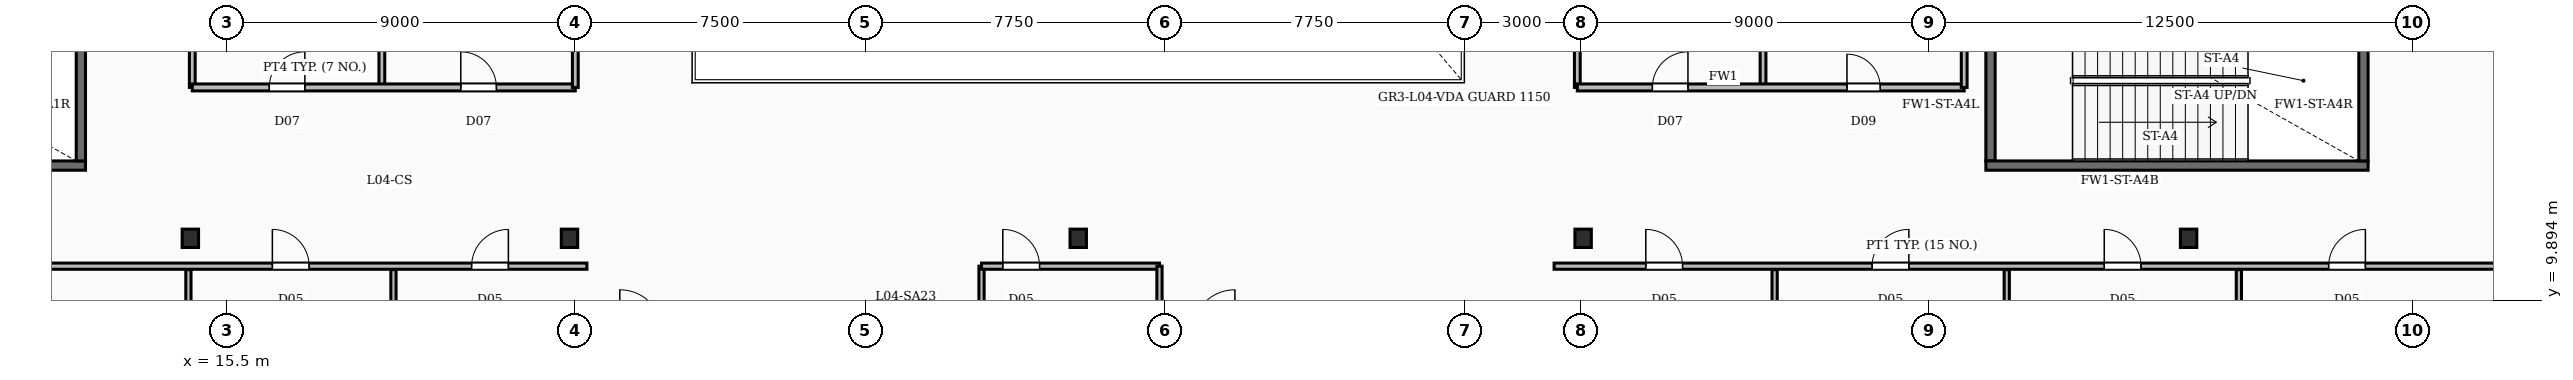
"""IFC4 building model, lengths in metres.
Left out: names, types, materials, properties, quantities, classifications, styles, units other than length and angle.
Written with IfcOpenShell. Run it as: python <this file> out.ifc"""

import sys

from ifc_helpers import new_model, si_unit, direction, frame, frame_2d, origin, origin_2d, place, context, subcontext, project, spatial, rectangle, i_section, extrude, element, fill, save


model = new_model("IFC4")
c1 = context("Model", 3, precision=1e-05, world=origin(), true_north=direction((0.0, 1.0)))
c2 = subcontext(c1, "Body", "Model", "MODEL_VIEW")
j1 = project(units=[si_unit("LENGTHUNIT", "METRE"), si_unit("PLANEANGLEUNIT", "RADIAN")], contexts=[c1])
p1 = place(None, origin())
s1 = spatial("IfcSite", under=j1, at=p1, CompositionType="ELEMENT")
p2 = place(p1, origin())
s2 = spatial("IfcBuilding", under=s1, at=p2, CompositionType="ELEMENT")
p3 = place(p2, frame((0.0, 0.0, 23.0)))
s3 = spatial("IfcBuildingStorey", under=s2, at=p3, CompositionType="ELEMENT", Elevation=23.0)
for number, where, z_axis, x_axis in (
    (1, (14.55, 11.5, -0.35), (0.0, 0.0, 1.0), (1.0, 0.0, 0.0)),
    (2, (24.35, 11.5, -0.35), (0.0, 0.0, 1.0), (1.0, 0.0, 0.0)),
    (3, (37.5, 11.5, -0.35), (0.0, 0.0, 1.0), (1.0, 0.0, 0.0)),
    (4, (50.55, 11.5, -0.35), (0.0, 0.0, 1.0), (1.0, 0.0, 0.0)),
    (5, (66.2, 11.5, -0.35), (0.0, 0.0, 1.0), (1.0, 0.0, 0.0)),
):
    element("IfcColumn", number, at=place(p3, frame(where, z_axis=z_axis, x_axis=x_axis)), inside=s3, PredefinedType="COLUMN", context=c2, shape_type="SweptSolid", body=[
        extrude(i_section(OverallWidth=0.424, OverallDepth=0.474, WebThickness=0.048, FlangeThickness=0.077, FilletRadius=0.02, at=origin_2d()), origin(), (0.0, 0.0, 1.0), 5.0),
    ])
p4 = place(p3, frame((1.96, 13.38, 0.0), z_axis=(0.0, 0.0, 1.0), x_axis=(1.0, 0.0, 0.0)))
e6 = element("IfcWall", 6, at=p4, inside=s3, PredefinedType="SOLIDWALL", context=c2, shape_type="SweptSolid", body=[
    extrude(rectangle(XDim=9.88, YDim=0.24, at=frame_2d((4.94, 0.0))), origin(), (0.0, 0.0, 1.0), 4.65),
])
p5 = place(p3, frame((11.72, 13.5, 0.0), z_axis=(0.0, 0.0, 1.0), x_axis=(0.0, 1.0, 0.0)))
e7 = element("IfcWall", 7, at=p5, inside=s3, PredefinedType="SOLIDWALL", context=c2, shape_type="SweptSolid", body=[
    extrude(rectangle(XDim=4.15, YDim=0.24, at=frame_2d((2.075, 0.0))), origin(), (0.0, 0.0, 1.0), 4.65),
])
p6 = place(p3, frame((60.96, 13.38, 0.0), z_axis=(0.0, 0.0, 1.0), x_axis=(1.0, 0.0, 0.0)))
e8 = element("IfcWall", 8, at=p6, inside=s3, PredefinedType="SOLIDWALL", context=c2, shape_type="SweptSolid", body=[
    extrude(rectangle(XDim=9.88, YDim=0.24, at=frame_2d((4.94, 0.0))), origin(), (0.0, 0.0, 1.0), 4.65),
])
for number, where, z_axis, x_axis in (
    (9, (61.08, 13.5, 0.0), (0.0, 0.0, 1.0), (0.0, 1.0, 0.0)),
    (10, (70.72, 13.5, 0.0), (0.0, 0.0, 1.0), (0.0, 1.0, 0.0)),
):
    element("IfcWall", number, at=place(p3, frame(where, z_axis=z_axis, x_axis=x_axis)), inside=s3, PredefinedType="SOLIDWALL", context=c2, shape_type="SweptSolid", body=[
        extrude(rectangle(XDim=4.15, YDim=0.24, at=frame_2d((2.075, 0.0))), origin(), (0.0, 0.0, 1.0), 4.65),
    ])
p7 = place(p3, frame((19.5, 15.4, 0.0), z_axis=(0.0, 0.0, 1.0), x_axis=(0.0, 1.0, 0.0)))
e11 = element("IfcWall", 11, at=p7, inside=s3, PredefinedType="PARTITIONING", context=c2, shape_type="SweptSolid", body=[
    extrude(rectangle(XDim=3.58, YDim=0.15, at=frame_2d((1.79, 0.0))), origin(), (0.0, 0.0, 1.0), 3.71),
])
p8 = place(p3, frame((14.6, 15.4, 0.0), z_axis=(0.0, 0.0, 1.0), x_axis=(1.0, 0.0, 0.0)))
e12 = element("IfcWall", 12, at=p8, inside=s3, PredefinedType="PARTITIONING", context=c2, shape_type="SweptSolid", body=[
    extrude(rectangle(XDim=9.9, YDim=0.18, at=frame_2d((4.95, 0.0))), origin(), (0.0, 0.0, 1.0), 3.71),
])
p9 = place(p8, frame((1.99, 0.0, 0.0)))
e13 = element("IfcOpeningElement", 13, at=p9, cuts=e12, PredefinedType="OPENING", context=c2, shape_type="SweptSolid", body=[
    extrude(rectangle(XDim=0.92, YDim=2.1, at=frame_2d((0.46, 1.05))), frame((0.0, 0.1, 0.0), z_axis=(0.0, -1.0, 0.0), x_axis=(1.0, 0.0, 0.0)), (0.0, 0.0, 1.0), 0.2),
])
p10 = place(p8, frame((6.94, 0.0, 0.0)))
e14 = element("IfcOpeningElement", 14, at=p10, cuts=e12, PredefinedType="OPENING", context=c2, shape_type="SweptSolid", body=[
    extrude(rectangle(XDim=0.92, YDim=2.1, at=frame_2d((0.46, 1.05))), frame((0.0, 0.1, 0.0), z_axis=(0.0, -1.0, 0.0), x_axis=(1.0, 0.0, 0.0)), (0.0, 0.0, 1.0), 0.2),
])
for number, where, z_axis, x_axis in (
    (15, (14.6, 15.4, 0.0), (0.0, 0.0, 1.0), (0.0, 1.0, 0.0)),
    (16, (24.5, 15.4, 0.0), (0.0, 0.0, 1.0), (0.0, 1.0, 0.0)),
    (17, (55.2, 15.4, 0.0), (0.0, 0.0, 1.0), (0.0, 1.0, 0.0)),
):
    element("IfcWall", number, at=place(p3, frame(where, z_axis=z_axis, x_axis=x_axis)), inside=s3, PredefinedType="PARTITIONING", context=c2, shape_type="SweptSolid", body=[
        extrude(rectangle(XDim=3.58, YDim=0.15, at=frame_2d((1.79, 0.0))), origin(), (0.0, 0.0, 1.0), 3.71),
    ])
p11 = place(p3, frame((50.4, 15.4, 0.0), z_axis=(0.0, 0.0, 1.0), x_axis=(1.0, 0.0, 0.0)))
e18 = element("IfcWall", 18, at=p11, inside=s3, PredefinedType="SOLIDWALL", context=c2, shape_type="SweptSolid", body=[
    extrude(rectangle(XDim=10.0, YDim=0.18, at=frame_2d((5.0, 0.0))), origin(), (0.0, 0.0, 1.0), 3.71),
])
p12 = place(p11, frame((1.94, 0.0, 0.0)))
e19 = element("IfcOpeningElement", 19, at=p12, cuts=e18, PredefinedType="OPENING", context=c2, shape_type="SweptSolid", body=[
    extrude(rectangle(XDim=0.92, YDim=2.1, at=frame_2d((0.46, 1.05))), frame((0.0, 0.1, 0.0), z_axis=(0.0, -1.0, 0.0), x_axis=(1.0, 0.0, 0.0)), (0.0, 0.0, 1.0), 0.2),
])
p13 = place(p11, frame((6.97, 0.0, 0.0)))
e20 = element("IfcOpeningElement", 20, at=p13, cuts=e18, PredefinedType="OPENING", context=c2, shape_type="SweptSolid", body=[
    extrude(rectangle(XDim=0.86, YDim=2.05, at=frame_2d((0.43, 1.025))), frame((0.0, 0.1, 0.0), z_axis=(0.0, -1.0, 0.0), x_axis=(1.0, 0.0, 0.0)), (0.0, 0.0, 1.0), 0.2),
])
for number, where, z_axis, x_axis in (
    (21, (50.4, 15.4, 0.0), (0.0, 0.0, 1.0), (0.0, 1.0, 0.0)),
    (22, (60.4, 15.4, 0.0), (0.0, 0.0, 1.0), (0.0, 1.0, 0.0)),
):
    element("IfcWall", number, at=place(p3, frame(where, z_axis=z_axis, x_axis=x_axis)), inside=s3, PredefinedType="PARTITIONING", context=c2, shape_type="SweptSolid", body=[
        extrude(rectangle(XDim=3.58, YDim=0.15, at=frame_2d((1.79, 0.0))), origin(), (0.0, 0.0, 1.0), 3.71),
    ])
p14 = place(p3, frame((14.5, 0.0, 0.0), z_axis=(0.0, 0.0, 1.0), x_axis=(0.0, 1.0, 0.0)))
e23 = element("IfcWall", 23, at=p14, inside=s3, PredefinedType="PARTITIONING", context=c2, shape_type="SweptSolid", body=[
    extrude(rectangle(XDim=10.69, YDim=0.135, at=frame_2d((5.345, 0.0))), origin(), (0.0, 0.0, 1.0), 3.71),
])
p15 = place(p14, frame((2.2, 0.0, 0.0)))
e24 = element("IfcOpeningElement", 24, at=p15, cuts=e23, PredefinedType="OPENING", context=c2, shape_type="SweptSolid", body=[
    extrude(rectangle(XDim=0.95, YDim=2.15, at=frame_2d((0.475, 1.075))), frame((0.0, 0.077, 0.0), z_axis=(0.0, -1.0, 0.0), x_axis=(1.0, 0.0, 0.0)), (0.0, 0.0, 1.0), 0.155),
])
p16 = place(p3, frame((19.8, 0.0, 0.0), z_axis=(0.0, 0.0, 1.0), x_axis=(0.0, 1.0, 0.0)))
e25 = element("IfcWall", 25, at=p16, inside=s3, PredefinedType="PARTITIONING", context=c2, shape_type="SweptSolid", body=[
    extrude(rectangle(XDim=10.69, YDim=0.135, at=frame_2d((5.345, 0.0))), origin(), (0.0, 0.0, 1.0), 3.71),
])
p17 = place(p16, frame((2.2, 0.0, 0.0)))
e26 = element("IfcOpeningElement", 26, at=p17, cuts=e25, PredefinedType="OPENING", context=c2, shape_type="SweptSolid", body=[
    extrude(rectangle(XDim=0.95, YDim=2.15, at=frame_2d((0.475, 1.075))), frame((0.0, 0.077, 0.0), z_axis=(0.0, -1.0, 0.0), x_axis=(1.0, 0.0, 0.0)), (0.0, 0.0, 1.0), 0.155),
])
p18 = place(p3, frame((0.0, 10.78, 0.0), z_axis=(0.0, 0.0, 1.0), x_axis=(1.0, 0.0, 0.0)))
e27 = element("IfcWall", 27, at=p18, inside=s3, PredefinedType="PARTITIONING", context=c2, shape_type="SweptSolid", body=[
    extrude(rectangle(XDim=24.8, YDim=0.16, at=frame_2d((12.4, 0.0))), origin(), (0.0, 0.0, 1.0), 3.71),
])
p19 = place(p18, frame((16.67, 0.0, 0.0)))
e28 = element("IfcOpeningElement", 28, at=p19, cuts=e27, PredefinedType="OPENING", context=c2, shape_type="SweptSolid", body=[
    extrude(rectangle(XDim=0.95, YDim=2.15, at=frame_2d((0.475, 1.075))), frame((0.0, 0.09, 0.0), z_axis=(0.0, -1.0, 0.0), x_axis=(1.0, 0.0, 0.0)), (0.0, 0.0, 1.0), 0.18),
])
p20 = place(p18, frame((21.82, 0.0, 0.0)))
e29 = element("IfcOpeningElement", 29, at=p20, cuts=e27, PredefinedType="OPENING", context=c2, shape_type="SweptSolid", body=[
    extrude(rectangle(XDim=0.95, YDim=2.15, at=frame_2d((0.475, 1.075))), frame((0.0, 0.09, 0.0), z_axis=(0.0, -1.0, 0.0), x_axis=(1.0, 0.0, 0.0)), (0.0, 0.0, 1.0), 0.18),
])
p21 = place(p3, frame((55.5, 0.0, 0.0), z_axis=(0.0, 0.0, 1.0), x_axis=(0.0, 1.0, 0.0)))
e30 = element("IfcWall", 30, at=p21, inside=s3, PredefinedType="PARTITIONING", context=c2, shape_type="SweptSolid", body=[
    extrude(rectangle(XDim=10.69, YDim=0.135, at=frame_2d((5.345, 0.0))), origin(), (0.0, 0.0, 1.0), 3.71),
])
p22 = place(p21, frame((2.2, 0.0, 0.0)))
e31 = element("IfcOpeningElement", 31, at=p22, cuts=e30, PredefinedType="OPENING", context=c2, shape_type="SweptSolid", body=[
    extrude(rectangle(XDim=0.95, YDim=2.15, at=frame_2d((0.475, 1.075))), frame((0.0, 0.077, 0.0), z_axis=(0.0, -1.0, 0.0), x_axis=(1.0, 0.0, 0.0)), (0.0, 0.0, 1.0), 0.155),
])
p23 = place(p3, frame((61.5, 0.0, 0.0), z_axis=(0.0, 0.0, 1.0), x_axis=(0.0, 1.0, 0.0)))
e32 = element("IfcWall", 32, at=p23, inside=s3, PredefinedType="PARTITIONING", context=c2, shape_type="SweptSolid", body=[
    extrude(rectangle(XDim=10.69, YDim=0.135, at=frame_2d((5.345, 0.0))), origin(), (0.0, 0.0, 1.0), 3.71),
])
p24 = place(p23, frame((2.2, 0.0, 0.0)))
e33 = element("IfcOpeningElement", 33, at=p24, cuts=e32, PredefinedType="OPENING", context=c2, shape_type="SweptSolid", body=[
    extrude(rectangle(XDim=0.95, YDim=2.15, at=frame_2d((0.475, 1.075))), frame((0.0, 0.077, 0.0), z_axis=(0.0, -1.0, 0.0), x_axis=(1.0, 0.0, 0.0)), (0.0, 0.0, 1.0), 0.155),
])
p25 = place(p3, frame((67.5, 0.0, 0.0), z_axis=(0.0, 0.0, 1.0), x_axis=(0.0, 1.0, 0.0)))
e34 = element("IfcWall", 34, at=p25, inside=s3, PredefinedType="PARTITIONING", context=c2, shape_type="SweptSolid", body=[
    extrude(rectangle(XDim=10.69, YDim=0.135, at=frame_2d((5.345, 0.0))), origin(), (0.0, 0.0, 1.0), 3.71),
])
p26 = place(p25, frame((2.2, 0.0, 0.0)))
e35 = element("IfcOpeningElement", 35, at=p26, cuts=e34, PredefinedType="OPENING", context=c2, shape_type="SweptSolid", body=[
    extrude(rectangle(XDim=0.95, YDim=2.15, at=frame_2d((0.475, 1.075))), frame((0.0, 0.077, 0.0), z_axis=(0.0, -1.0, 0.0), x_axis=(1.0, 0.0, 0.0)), (0.0, 0.0, 1.0), 0.155),
])
p27 = place(p3, frame((49.8, 10.78, 0.0), z_axis=(0.0, 0.0, 1.0), x_axis=(1.0, 0.0, 0.0)))
e36 = element("IfcWall", 36, at=p27, inside=s3, PredefinedType="PARTITIONING", context=c2, shape_type="SweptSolid", body=[
    extrude(rectangle(XDim=29.7, YDim=0.16, at=frame_2d((14.85, 0.0))), origin(), (0.0, 0.0, 1.0), 3.71),
])
p28 = place(p27, frame((2.37, 0.0, 0.0)))
e37 = element("IfcOpeningElement", 37, at=p28, cuts=e36, PredefinedType="OPENING", context=c2, shape_type="SweptSolid", body=[
    extrude(rectangle(XDim=0.95, YDim=2.15, at=frame_2d((0.475, 1.075))), frame((0.0, 0.09, 0.0), z_axis=(0.0, -1.0, 0.0), x_axis=(1.0, 0.0, 0.0)), (0.0, 0.0, 1.0), 0.18),
])
p29 = place(p27, frame((8.22, 0.0, 0.0)))
e38 = element("IfcOpeningElement", 38, at=p29, cuts=e36, PredefinedType="OPENING", context=c2, shape_type="SweptSolid", body=[
    extrude(rectangle(XDim=0.95, YDim=2.15, at=frame_2d((0.475, 1.075))), frame((0.0, 0.09, 0.0), z_axis=(0.0, -1.0, 0.0), x_axis=(1.0, 0.0, 0.0)), (0.0, 0.0, 1.0), 0.18),
])
p30 = place(p27, frame((14.22, 0.0, 0.0)))
e39 = element("IfcOpeningElement", 39, at=p30, cuts=e36, PredefinedType="OPENING", context=c2, shape_type="SweptSolid", body=[
    extrude(rectangle(XDim=0.95, YDim=2.15, at=frame_2d((0.475, 1.075))), frame((0.0, 0.09, 0.0), z_axis=(0.0, -1.0, 0.0), x_axis=(1.0, 0.0, 0.0)), (0.0, 0.0, 1.0), 0.18),
])
p31 = place(p27, frame((20.02, 0.0, 0.0)))
e40 = element("IfcOpeningElement", 40, at=p31, cuts=e36, PredefinedType="OPENING", context=c2, shape_type="SweptSolid", body=[
    extrude(rectangle(XDim=0.95, YDim=2.15, at=frame_2d((0.475, 1.075))), frame((0.0, 0.09, 0.0), z_axis=(0.0, -1.0, 0.0), x_axis=(1.0, 0.0, 0.0)), (0.0, 0.0, 1.0), 0.18),
])
p32 = place(p3, frame((35.0, 10.78, 0.0), z_axis=(0.0, 0.0, 1.0), x_axis=(1.0, 0.0, 0.0)))
e41 = element("IfcWall", 41, at=p32, inside=s3, PredefinedType="PARTITIONING", context=c2, shape_type="SweptSolid", body=[
    extrude(rectangle(XDim=4.6, YDim=0.16, at=frame_2d((2.3, 0.0))), origin(), (0.0, 0.0, 1.0), 3.71),
])
p33 = place(p32, frame((0.55, 0.0, 0.0)))
e42 = element("IfcOpeningElement", 42, at=p33, cuts=e41, PredefinedType="OPENING", context=c2, shape_type="SweptSolid", body=[
    extrude(rectangle(XDim=0.95, YDim=2.15, at=frame_2d((0.475, 1.075))), frame((0.0, 0.09, 0.0), z_axis=(0.0, -1.0, 0.0), x_axis=(1.0, 0.0, 0.0)), (0.0, 0.0, 1.0), 0.18),
])
for number, where, z_axis, x_axis in (
    (43, (35.0, 0.0, 0.0), (0.0, 0.0, 1.0), (0.0, 1.0, 0.0)),
    (44, (39.6, 0.0, 0.0), (0.0, 0.0, 1.0), (0.0, 1.0, 0.0)),
):
    element("IfcWall", number, at=place(p3, frame(where, z_axis=z_axis, x_axis=x_axis)), inside=s3, PredefinedType="PARTITIONING", context=c2, shape_type="SweptSolid", body=[
        extrude(rectangle(XDim=10.78, YDim=0.135, at=frame_2d((5.39, 0.0))), origin(), (0.0, 0.0, 1.0), 3.71),
    ])
p34 = place(p9, origin())
e45 = element("IfcDoor", 45, at=p34, inside=s3, OperationType="SINGLE_SWING_RIGHT", PredefinedType="DOOR", context=c2, shape_type="SweptSolid", body=[
    extrude(rectangle(XDim=0.92, YDim=2.1, at=frame_2d((0.46, 1.05))), frame((0.0, 0.025, 0.0), z_axis=(0.0, -1.0, 0.0), x_axis=(1.0, 0.0, 0.0)), (0.0, 0.0, 1.0), 0.05),
])
fill(e13, e45)
p35 = place(p10, origin())
e46 = element("IfcDoor", 46, at=p35, inside=s3, OperationType="SINGLE_SWING_LEFT", PredefinedType="DOOR", context=c2, shape_type="SweptSolid", body=[
    extrude(rectangle(XDim=0.92, YDim=2.1, at=frame_2d((0.46, 1.05))), frame((0.0, 0.025, 0.0), z_axis=(0.0, -1.0, 0.0), x_axis=(1.0, 0.0, 0.0)), (0.0, 0.0, 1.0), 0.05),
])
fill(e14, e46)
p36 = place(p12, origin())
e47 = element("IfcDoor", 47, at=p36, inside=s3, OperationType="SINGLE_SWING_RIGHT", PredefinedType="DOOR", context=c2, shape_type="SweptSolid", body=[
    extrude(rectangle(XDim=0.92, YDim=2.1, at=frame_2d((0.46, 1.05))), frame((0.0, 0.025, 0.0), z_axis=(0.0, -1.0, 0.0), x_axis=(1.0, 0.0, 0.0)), (0.0, 0.0, 1.0), 0.05),
])
fill(e19, e47)
p37 = place(p13, origin())
e48 = element("IfcDoor", 48, at=p37, inside=s3, OperationType="SINGLE_SWING_LEFT", PredefinedType="DOOR", context=c2, shape_type="SweptSolid", body=[
    extrude(rectangle(XDim=0.86, YDim=2.05, at=frame_2d((0.43, 1.025))), frame((0.0, 0.025, 0.0), z_axis=(0.0, -1.0, 0.0), x_axis=(1.0, 0.0, 0.0)), (0.0, 0.0, 1.0), 0.05),
])
fill(e20, e48)
p38 = place(p19, origin())
e49 = element("IfcDoor", 49, at=p38, inside=s3, OperationType="SINGLE_SWING_LEFT", PredefinedType="DOOR", context=c2, shape_type="SweptSolid", body=[
    extrude(rectangle(XDim=0.95, YDim=2.15, at=frame_2d((0.475, 1.075))), frame((0.0, 0.025, 0.0), z_axis=(0.0, -1.0, 0.0), x_axis=(1.0, 0.0, 0.0)), (0.0, 0.0, 1.0), 0.05),
])
fill(e28, e49)
p39 = place(p20, origin())
e50 = element("IfcDoor", 50, at=p39, inside=s3, OperationType="SINGLE_SWING_RIGHT", PredefinedType="DOOR", context=c2, shape_type="SweptSolid", body=[
    extrude(rectangle(XDim=0.95, YDim=2.15, at=frame_2d((0.475, 1.075))), frame((0.0, 0.025, 0.0), z_axis=(0.0, -1.0, 0.0), x_axis=(1.0, 0.0, 0.0)), (0.0, 0.0, 1.0), 0.05),
])
fill(e29, e50)
p40 = place(p28, origin())
e51 = element("IfcDoor", 51, at=p40, inside=s3, OperationType="SINGLE_SWING_LEFT", PredefinedType="DOOR", context=c2, shape_type="SweptSolid", body=[
    extrude(rectangle(XDim=0.95, YDim=2.15, at=frame_2d((0.475, 1.075))), frame((0.0, 0.025, 0.0), z_axis=(0.0, -1.0, 0.0), x_axis=(1.0, 0.0, 0.0)), (0.0, 0.0, 1.0), 0.05),
])
fill(e37, e51)
p41 = place(p29, origin())
e52 = element("IfcDoor", 52, at=p41, inside=s3, OperationType="SINGLE_SWING_RIGHT", PredefinedType="DOOR", context=c2, shape_type="SweptSolid", body=[
    extrude(rectangle(XDim=0.95, YDim=2.15, at=frame_2d((0.475, 1.075))), frame((0.0, 0.025, 0.0), z_axis=(0.0, -1.0, 0.0), x_axis=(1.0, 0.0, 0.0)), (0.0, 0.0, 1.0), 0.05),
])
fill(e38, e52)
p42 = place(p30, origin())
e53 = element("IfcDoor", 53, at=p42, inside=s3, OperationType="SINGLE_SWING_LEFT", PredefinedType="DOOR", context=c2, shape_type="SweptSolid", body=[
    extrude(rectangle(XDim=0.95, YDim=2.15, at=frame_2d((0.475, 1.075))), frame((0.0, 0.025, 0.0), z_axis=(0.0, -1.0, 0.0), x_axis=(1.0, 0.0, 0.0)), (0.0, 0.0, 1.0), 0.05),
])
fill(e39, e53)
p43 = place(p31, origin())
e54 = element("IfcDoor", 54, at=p43, inside=s3, OperationType="SINGLE_SWING_RIGHT", PredefinedType="DOOR", context=c2, shape_type="SweptSolid", body=[
    extrude(rectangle(XDim=0.95, YDim=2.15, at=frame_2d((0.475, 1.075))), frame((0.0, 0.025, 0.0), z_axis=(0.0, -1.0, 0.0), x_axis=(1.0, 0.0, 0.0)), (0.0, 0.0, 1.0), 0.05),
])
fill(e40, e54)
p44 = place(p33, origin())
e55 = element("IfcDoor", 55, at=p44, inside=s3, OperationType="SINGLE_SWING_LEFT", PredefinedType="DOOR", context=c2, shape_type="SweptSolid", body=[
    extrude(rectangle(XDim=0.95, YDim=2.15, at=frame_2d((0.475, 1.075))), frame((0.0, 0.025, 0.0), z_axis=(0.0, -1.0, 0.0), x_axis=(1.0, 0.0, 0.0)), (0.0, 0.0, 1.0), 0.05),
])
fill(e42, e55)
save(model, sys.argv[1])
